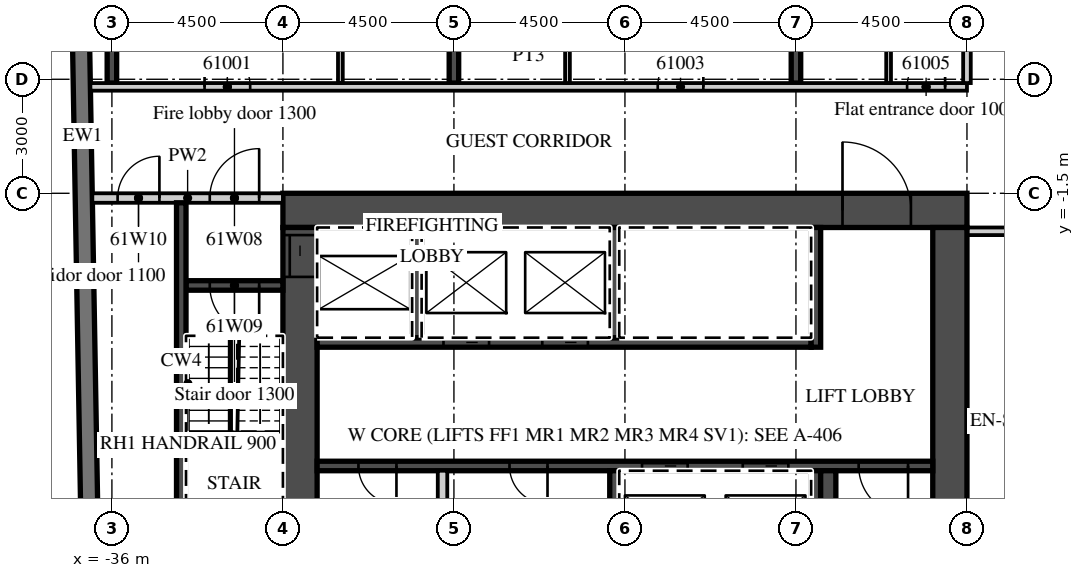
"""IFC4 building model, lengths in metres.
Left out: names, types, materials, properties, quantities, classifications, styles, units other than length and angle.
Written with IfcOpenShell. Run it as: python <this file> out.ifc"""

import sys

from ifc_helpers import new_model, si_unit, direction, frame, frame_2d, origin, place, context, subcontext, project, spatial, rectangle, extrude, element, fill, save


model = new_model("IFC4")
c1 = context("Model", 3, precision=1e-05, world=origin(), true_north=direction((0.0, 1.0)))
c2 = subcontext(c1, "Body", "Model", "MODEL_VIEW")
j1 = project(units=[si_unit("LENGTHUNIT", "METRE"), si_unit("PLANEANGLEUNIT", "RADIAN")], contexts=[c1])
p1 = place(None, origin())
s1 = spatial("IfcSite", under=j1, at=p1, CompositionType="ELEMENT")
p2 = place(p1, origin())
s2 = spatial("IfcBuilding", under=s1, at=p2, CompositionType="ELEMENT")
p3 = place(p2, frame((0.0, 0.0, 247.4)))
s3 = spatial("IfcBuildingStorey", under=s2, at=p3, CompositionType="ELEMENT", Elevation=247.4)
p4 = place(p3, frame((-36.0, 1.4, 0.0), z_axis=(0.0, 0.0, 1.0), x_axis=(0.0, 1.0, 0.0)))
e1 = element("IfcWall", 1, at=p4, inside=s3, PredefinedType="SHEAR", context=c2, shape_type="SweptSolid", body=[
    extrude(rectangle(XDim=17.125, YDim=0.25, at=frame_2d((8.563, 0.0))), origin(), (0.0, 0.0, 1.0), 3.3),
])
p5 = place(p3, frame((-27.0, 1.4, 0.0), z_axis=(0.0, 0.0, 1.0), x_axis=(0.0, 1.0, 0.0)))
e2 = element("IfcWall", 2, at=p5, inside=s3, PredefinedType="SHEAR", context=c2, shape_type="SweptSolid", body=[
    extrude(rectangle(XDim=18.817, YDim=0.25, at=frame_2d((9.409, 0.0))), origin(), (0.0, 0.0, 1.0), 3.3),
])
p6 = place(p3, frame((-18.0, 1.4, 0.0), z_axis=(0.0, 0.0, 1.0), x_axis=(0.0, 1.0, 0.0)))
e3 = element("IfcWall", 3, at=p6, inside=s3, PredefinedType="SHEAR", context=c2, shape_type="SweptSolid", body=[
    extrude(rectangle(XDim=18.974, YDim=0.25, at=frame_2d((9.487, 0.0))), origin(), (0.0, 0.0, 1.0), 3.3),
])
p7 = place(p3, frame((-37.057, 16.503, 0.0), z_axis=(0.0, 0.0, 1.0), x_axis=(0.017452279857, -0.999847697366, 0.0)))
e4 = element("IfcWall", 4, at=p7, inside=s3, PredefinedType="SOLIDWALL", context=c2, shape_type="SweptSolid", body=[
    extrude(rectangle(XDim=33.0, YDim=0.45, at=frame_2d((16.5, 0.0))), origin(), (0.0, 0.0, 1.0), 3.02),
])
p8 = place(p3, frame((-36.566, 1.3, 0.0), z_axis=(0.0, 0.0, 1.0), x_axis=(1.0, 0.0, 0.0)))
e5 = element("IfcWall", 5, at=p8, inside=s3, PredefinedType="PARTITIONING", context=c2, shape_type="SweptSolid", body=[
    extrude(rectangle(XDim=23.066, YDim=0.2, at=frame_2d((11.533, 0.0))), origin(), (0.0, 0.0, 1.0), 3.02),
])
p9 = place(p8, frame((3.004, 0.0, 0.0)))
e6 = element("IfcOpeningElement", 6, at=p9, cuts=e5, PredefinedType="OPENING", context=c2, shape_type="SweptSolid", body=[
    extrude(rectangle(XDim=1.2, YDim=2.1, at=frame_2d((0.6, 1.05))), frame((0.0, 0.11, 0.0), z_axis=(0.0, -1.0, 0.0), x_axis=(1.0, 0.0, 0.0)), (0.0, 0.0, 1.0), 0.22),
])
p10 = place(p8, frame((14.929, 0.0, 0.0)))
e7 = element("IfcOpeningElement", 7, at=p10, cuts=e5, PredefinedType="OPENING", context=c2, shape_type="SweptSolid", body=[
    extrude(rectangle(XDim=1.2, YDim=2.1, at=frame_2d((0.6, 1.05))), frame((0.0, 0.11, 0.0), z_axis=(0.0, -1.0, 0.0), x_axis=(1.0, 0.0, 0.0)), (0.0, 0.0, 1.0), 0.22),
])
p11 = place(p8, frame((21.491, 0.0, 0.0)))
e8 = element("IfcOpeningElement", 8, at=p11, cuts=e5, PredefinedType="OPENING", context=c2, shape_type="SweptSolid", body=[
    extrude(rectangle(XDim=1.0, YDim=2.1, at=frame_2d((0.5, 1.05))), frame((0.0, 0.11, 0.0), z_axis=(0.0, -1.0, 0.0), x_axis=(1.0, 0.0, 0.0)), (0.0, 0.0, 1.0), 0.22),
])
p12 = place(p3, frame((-29.988, 1.4, 0.0), z_axis=(0.0, 0.0, 1.0), x_axis=(0.0, 1.0, 0.0)))
e9 = element("IfcWall", 9, at=p12, inside=s3, PredefinedType="PARTITIONING", context=c2, shape_type="SweptSolid", body=[
    extrude(rectangle(XDim=7.725, YDim=0.125, at=frame_2d((3.863, 0.0))), origin(), (0.0, 0.0, 1.0), 3.02),
])
p13 = place(p12, frame((2.45, 0.0, 0.0)))
e10 = element("IfcOpeningElement", 10, at=p13, cuts=e9, PredefinedType="OPENING", context=c2, shape_type="SweptSolid", body=[
    extrude(rectangle(XDim=0.9, YDim=2.1, at=frame_2d((0.45, 1.05))), frame((0.0, 0.073, 0.0), z_axis=(0.0, -1.0, 0.0), x_axis=(1.0, 0.0, 0.0)), (0.0, 0.0, 1.0), 0.145),
])
p14 = place(p3, frame((-24.012, 1.4, 0.0), z_axis=(0.0, 0.0, 1.0), x_axis=(0.0, 1.0, 0.0)))
e11 = element("IfcWall", 11, at=p14, inside=s3, PredefinedType="PARTITIONING", context=c2, shape_type="SweptSolid", body=[
    extrude(rectangle(XDim=7.725, YDim=0.125, at=frame_2d((3.863, 0.0))), origin(), (0.0, 0.0, 1.0), 3.02),
])
p15 = place(p14, frame((2.45, 0.0, 0.0)))
e12 = element("IfcOpeningElement", 12, at=p15, cuts=e11, PredefinedType="OPENING", context=c2, shape_type="SweptSolid", body=[
    extrude(rectangle(XDim=0.9, YDim=2.1, at=frame_2d((0.45, 1.05))), frame((0.0, 0.073, 0.0), z_axis=(0.0, -1.0, 0.0), x_axis=(1.0, 0.0, 0.0)), (0.0, 0.0, 1.0), 0.145),
])
p16 = place(p3, frame((-13.5, 1.4, 0.0), z_axis=(0.0, 0.0, 1.0), x_axis=(0.0, 1.0, 0.0)))
e13 = element("IfcWall", 13, at=p16, inside=s3, PredefinedType="PARTITIONING", context=c2, shape_type="SweptSolid", body=[
    extrude(rectangle(XDim=19.065, YDim=0.2, at=frame_2d((9.533, 0.0))), origin(), (0.0, 0.0, 1.0), 3.02),
])
p17 = place(p3, frame((-15.562, 1.4, 0.0), z_axis=(0.0, 0.0, 1.0), x_axis=(0.0, 1.0, 0.0)))
e14 = element("IfcWall", 14, at=p17, inside=s3, PredefinedType="PARTITIONING", context=c2, shape_type="SweptSolid", body=[
    extrude(rectangle(XDim=7.725, YDim=0.125, at=frame_2d((3.863, 0.0))), origin(), (0.0, 0.0, 1.0), 3.02),
])
p18 = place(p17, frame((2.45, 0.0, 0.0)))
e15 = element("IfcOpeningElement", 15, at=p18, cuts=e14, PredefinedType="OPENING", context=c2, shape_type="SweptSolid", body=[
    extrude(rectangle(XDim=0.9, YDim=2.1, at=frame_2d((0.45, 1.05))), frame((0.0, 0.073, 0.0), z_axis=(0.0, -1.0, 0.0), x_axis=(1.0, 0.0, 0.0)), (0.0, 0.0, 1.0), 0.145),
])
p19 = place(p3, frame((-13.5, -2.5, 0.0), z_axis=(0.0, 0.0, 1.0), x_axis=(1.0, 0.0, 0.0)))
e16 = element("IfcWall", 16, at=p19, inside=s3, PredefinedType="PARTITIONING", context=c2, shape_type="SweptSolid", body=[
    extrude(rectangle(XDim=27.0, YDim=0.2, at=frame_2d((13.5, 0.0))), origin(), (0.0, 0.0, 1.0), 3.02),
])
p20 = place(p19, frame((2.925, 0.0, 0.0)))
e17 = element("IfcOpeningElement", 17, at=p20, cuts=e16, PredefinedType="OPENING", context=c2, shape_type="SweptSolid", body=[
    extrude(rectangle(XDim=1.0, YDim=2.1, at=frame_2d((0.5, 1.05))), frame((0.0, 0.11, 0.0), z_axis=(0.0, -1.0, 0.0), x_axis=(1.0, 0.0, 0.0)), (0.0, 0.0, 1.0), 0.22),
])
p21 = place(p19, frame((5.075, 0.0, 0.0)))
e18 = element("IfcOpeningElement", 18, at=p21, cuts=e16, PredefinedType="OPENING", context=c2, shape_type="SweptSolid", body=[
    extrude(rectangle(XDim=1.0, YDim=2.1, at=frame_2d((0.5, 1.05))), frame((0.0, 0.11, 0.0), z_axis=(0.0, -1.0, 0.0), x_axis=(1.0, 0.0, 0.0)), (0.0, 0.0, 1.0), 0.22),
])
p22 = place(p19, frame((9.55, 0.0, 0.0)))
e19 = element("IfcOpeningElement", 19, at=p22, cuts=e16, PredefinedType="OPENING", context=c2, shape_type="SweptSolid", body=[
    extrude(rectangle(XDim=1.0, YDim=2.1, at=frame_2d((0.5, 1.05))), frame((0.0, 0.11, 0.0), z_axis=(0.0, -1.0, 0.0), x_axis=(1.0, 0.0, 0.0)), (0.0, 0.0, 1.0), 0.22),
])
p23 = place(p19, frame((14.075, 0.0, 0.0)))
e20 = element("IfcOpeningElement", 20, at=p23, cuts=e16, PredefinedType="OPENING", context=c2, shape_type="SweptSolid", body=[
    extrude(rectangle(XDim=1.0, YDim=2.1, at=frame_2d((0.5, 1.05))), frame((0.0, 0.11, 0.0), z_axis=(0.0, -1.0, 0.0), x_axis=(1.0, 0.0, 0.0)), (0.0, 0.0, 1.0), 0.22),
])
p24 = place(p19, frame((20.925, 0.0, 0.0)))
e21 = element("IfcOpeningElement", 21, at=p24, cuts=e16, PredefinedType="OPENING", context=c2, shape_type="SweptSolid", body=[
    extrude(rectangle(XDim=1.0, YDim=2.1, at=frame_2d((0.5, 1.05))), frame((0.0, 0.11, 0.0), z_axis=(0.0, -1.0, 0.0), x_axis=(1.0, 0.0, 0.0)), (0.0, 0.0, 1.0), 0.22),
])
p25 = place(p19, frame((23.075, 0.0, 0.0)))
e22 = element("IfcOpeningElement", 22, at=p25, cuts=e16, PredefinedType="OPENING", context=c2, shape_type="SweptSolid", body=[
    extrude(rectangle(XDim=1.0, YDim=2.1, at=frame_2d((0.5, 1.05))), frame((0.0, 0.11, 0.0), z_axis=(0.0, -1.0, 0.0), x_axis=(1.0, 0.0, 0.0)), (0.0, 0.0, 1.0), 0.22),
])
p26 = place(p3, frame((-31.5, -1.95, 0.0), z_axis=(0.0, 0.0, 1.0), x_axis=(1.0, 0.0, 0.0)))
e23 = element("IfcWall", 23, at=p26, inside=s3, PredefinedType="SHEAR", context=c2, shape_type="SweptSolid", body=[
    extrude(rectangle(XDim=18.0, YDim=0.9, at=frame_2d((9.0, 0.0))), origin(), (0.0, 0.0, 1.0), 3.02),
])
p27 = place(p26, frame((14.725, 0.0, 0.0)))
e24 = element("IfcOpeningElement", 24, at=p27, cuts=e23, PredefinedType="OPENING", context=c2, shape_type="SweptSolid", body=[
    extrude(rectangle(XDim=1.8, YDim=2.1, at=frame_2d((0.9, 1.05))), frame((0.0, 0.46, 0.0), z_axis=(0.0, -1.0, 0.0), x_axis=(1.0, 0.0, 0.0)), (0.0, 0.0, 1.0), 0.92),
])
p28 = place(p3, frame((-31.05, -15.2, 0.0), z_axis=(0.0, 0.0, 1.0), x_axis=(0.0, 1.0, 0.0)))
e25 = element("IfcWall", 25, at=p28, inside=s3, PredefinedType="SHEAR", context=c2, shape_type="SweptSolid", body=[
    extrude(rectangle(XDim=12.8, YDim=0.9, at=frame_2d((6.4, 0.0))), origin(), (0.0, 0.0, 1.0), 3.02),
])
p29 = place(p28, frame((11.5, 0.0, 0.0)))
e26 = element("IfcOpeningElement", 26, at=p29, cuts=e25, PredefinedType="OPENING", context=c2, shape_type="SweptSolid", body=[
    extrude(rectangle(XDim=1.1, YDim=2.1, at=frame_2d((0.55, 1.05))), frame((0.0, 0.46, 0.0), z_axis=(0.0, -1.0, 0.0), x_axis=(1.0, 0.0, 0.0)), (0.0, 0.0, 1.0), 0.92),
])
p30 = place(p3, frame((-13.95, -14.6, 0.0), z_axis=(0.0, 0.0, 1.0), x_axis=(0.0, 1.0, 0.0)))
e27 = element("IfcWall", 27, at=p30, inside=s3, PredefinedType="SHEAR", context=c2, shape_type="SweptSolid", body=[
    extrude(rectangle(XDim=12.2, YDim=0.9, at=frame_2d((6.1, 0.0))), origin(), (0.0, 0.0, 1.0), 3.02),
])
p31 = place(p3, frame((-30.6, -5.425, 0.0), z_axis=(0.0, 0.0, 1.0), x_axis=(1.0, 0.0, 0.0)))
e28 = element("IfcWall", 28, at=p31, inside=s3, PredefinedType="SHEAR", context=c2, shape_type="SweptSolid", body=[
    extrude(rectangle(XDim=13.0, YDim=0.25, at=frame_2d((6.5, 0.0))), origin(), (0.0, 0.0, 1.0), 3.02),
])
p32 = place(p31, frame((3.325, 0.0, 0.0)))
e29 = element("IfcOpeningElement", 29, at=p32, cuts=e28, PredefinedType="OPENING", context=c2, shape_type="SweptSolid", body=[
    extrude(rectangle(XDim=1.2, YDim=2.1, at=frame_2d((0.6, 1.05))), frame((0.0, 0.135, 0.0), z_axis=(0.0, -1.0, 0.0), x_axis=(1.0, 0.0, 0.0)), (0.0, 0.0, 1.0), 0.27),
])
p33 = place(p31, frame((5.925, 0.0, 0.0)))
e30 = element("IfcOpeningElement", 30, at=p33, cuts=e28, PredefinedType="OPENING", context=c2, shape_type="SweptSolid", body=[
    extrude(rectangle(XDim=1.2, YDim=2.1, at=frame_2d((0.6, 1.05))), frame((0.0, 0.135, 0.0), z_axis=(0.0, -1.0, 0.0), x_axis=(1.0, 0.0, 0.0)), (0.0, 0.0, 1.0), 0.27),
])
p34 = place(p3, frame((-17.475, -5.55, 0.0), z_axis=(0.0, 0.0, 1.0), x_axis=(0.0, 1.0, 0.0)))
e31 = element("IfcWall", 31, at=p34, inside=s3, PredefinedType="SHEAR", context=c2, shape_type="SweptSolid", body=[
    extrude(rectangle(XDim=3.15, YDim=0.25, at=frame_2d((1.575, 0.0))), origin(), (0.0, 0.0, 1.0), 3.02),
])
for number, where, z_axis, x_axis in (
    (32, (-27.975, -5.3, 0.0), (0.0, 0.0, 1.0), (0.0, 1.0, 0.0)),
    (33, (-22.775, -5.3, 0.0), (0.0, 0.0, 1.0), (0.0, 1.0, 0.0)),
):
    element("IfcWall", number, at=place(p3, frame(where, z_axis=z_axis, x_axis=x_axis)), inside=s3, PredefinedType="SHEAR", context=c2, shape_type="SweptSolid", body=[
        extrude(rectangle(XDim=2.9, YDim=0.25, at=frame_2d((1.45, 0.0))), origin(), (0.0, 0.0, 1.0), 3.02),
    ])
p35 = place(p3, frame((-30.6, -8.675, 0.0), z_axis=(0.0, 0.0, 1.0), x_axis=(1.0, 0.0, 0.0)))
e34 = element("IfcWall", 34, at=p35, inside=s3, PredefinedType="SHEAR", context=c2, shape_type="SweptSolid", body=[
    extrude(rectangle(XDim=16.2, YDim=0.25, at=frame_2d((8.1, 0.0))), origin(), (0.0, 0.0, 1.0), 3.02),
])
p36 = place(p35, frame((8.55, 0.0, 0.0)))
e35 = element("IfcOpeningElement", 35, at=p36, cuts=e34, PredefinedType="OPENING", context=c2, shape_type="SweptSolid", body=[
    extrude(rectangle(XDim=1.2, YDim=2.1, at=frame_2d((0.6, 1.05))), frame((0.0, 0.135, 0.0), z_axis=(0.0, -1.0, 0.0), x_axis=(1.0, 0.0, 0.0)), (0.0, 0.0, 1.0), 0.27),
])
p37 = place(p35, frame((11.2, 0.0, 0.0)))
e36 = element("IfcOpeningElement", 36, at=p37, cuts=e34, PredefinedType="OPENING", context=c2, shape_type="SweptSolid", body=[
    extrude(rectangle(XDim=1.2, YDim=2.1, at=frame_2d((0.6, 1.05))), frame((0.0, 0.135, 0.0), z_axis=(0.0, -1.0, 0.0), x_axis=(1.0, 0.0, 0.0)), (0.0, 0.0, 1.0), 0.27),
])
p38 = place(p35, frame((14.25, 0.0, 0.0)))
e37 = element("IfcOpeningElement", 37, at=p38, cuts=e34, PredefinedType="OPENING", context=c2, shape_type="SweptSolid", body=[
    extrude(rectangle(XDim=1.3, YDim=2.1, at=frame_2d((0.65, 1.05))), frame((0.0, 0.135, 0.0), z_axis=(0.0, -1.0, 0.0), x_axis=(1.0, 0.0, 0.0)), (0.0, 0.0, 1.0), 0.27),
])
p39 = place(p35, frame((1.087, 0.0, 0.0)))
e38 = element("IfcOpeningElement", 38, at=p39, cuts=e34, PredefinedType="OPENING", context=c2, shape_type="SweptSolid", body=[
    extrude(rectangle(XDim=1.0, YDim=2.1, at=frame_2d((0.5, 1.05))), frame((0.0, 0.135, 0.0), z_axis=(0.0, -1.0, 0.0), x_axis=(1.0, 0.0, 0.0)), (0.0, 0.0, 1.0), 0.27),
])
p40 = place(p35, frame((5.062, 0.0, 0.0)))
e39 = element("IfcOpeningElement", 39, at=p40, cuts=e34, PredefinedType="OPENING", context=c2, shape_type="SweptSolid", body=[
    extrude(rectangle(XDim=1.0, YDim=2.1, at=frame_2d((0.5, 1.05))), frame((0.0, 0.135, 0.0), z_axis=(0.0, -1.0, 0.0), x_axis=(1.0, 0.0, 0.0)), (0.0, 0.0, 1.0), 0.27),
])
for number, where, z_axis, x_axis in (
    (40, (-17.475, -11.7, 0.0), (0.0, 0.0, 1.0), (0.0, 1.0, 0.0)),
    (41, (-22.775, -11.7, 0.0), (0.0, 0.0, 1.0), (0.0, 1.0, 0.0)),
):
    element("IfcWall", number, at=place(p3, frame(where, z_axis=z_axis, x_axis=x_axis)), inside=s3, PredefinedType="SHEAR", context=c2, shape_type="SweptSolid", body=[
        extrude(rectangle(XDim=2.9, YDim=0.25, at=frame_2d((1.45, 0.0))), origin(), (0.0, 0.0, 1.0), 3.02),
    ])
p41 = place(p3, frame((-27.3, -11.7, 0.0), z_axis=(0.0, 0.0, 1.0), x_axis=(0.0, 1.0, 0.0)))
e42 = element("IfcWall", 42, at=p41, inside=s3, PredefinedType="PARTITIONING", context=c2, shape_type="SweptSolid", body=[
    extrude(rectangle(XDim=2.9, YDim=0.25, at=frame_2d((1.45, 0.0))), origin(), (0.0, 0.0, 1.0), 3.02),
])
p42 = place(p3, frame((-17.15, -14.6, 0.0), z_axis=(0.0, 0.0, 1.0), x_axis=(0.0, 1.0, 0.0)))
e43 = element("IfcWall", 43, at=p42, inside=s3, PredefinedType="SHEAR", context=c2, shape_type="SweptSolid", body=[
    extrude(rectangle(XDim=5.8, YDim=0.4, at=frame_2d((2.9, 0.0))), origin(), (0.0, 0.0, 1.0), 3.02),
])
p43 = place(p3, frame((-36.515, -1.625, 0.0), z_axis=(0.0, 0.0, 1.0), x_axis=(1.0, 0.0, 0.0)))
e44 = element("IfcWall", 44, at=p43, inside=s3, PredefinedType="PARTITIONING", context=c2, shape_type="SweptSolid", body=[
    extrude(rectangle(XDim=5.015, YDim=0.25, at=frame_2d((2.508, 0.0))), origin(), (0.0, 0.0, 1.0), 3.02),
])
p44 = place(p43, frame((3.09, 0.0, 0.0)))
e45 = element("IfcOpeningElement", 45, at=p44, cuts=e44, PredefinedType="OPENING", context=c2, shape_type="SweptSolid", body=[
    extrude(rectangle(XDim=1.3, YDim=2.1, at=frame_2d((0.65, 1.05))), frame((0.0, 0.135, 0.0), z_axis=(0.0, -1.0, 0.0), x_axis=(1.0, 0.0, 0.0)), (0.0, 0.0, 1.0), 0.27),
])
p45 = place(p43, frame((0.665, 0.0, 0.0)))
e46 = element("IfcOpeningElement", 46, at=p45, cuts=e44, PredefinedType="OPENING", context=c2, shape_type="SweptSolid", body=[
    extrude(rectangle(XDim=1.1, YDim=2.1, at=frame_2d((0.55, 1.05))), frame((0.0, 0.135, 0.0), z_axis=(0.0, -1.0, 0.0), x_axis=(1.0, 0.0, 0.0)), (0.0, 0.0, 1.0), 0.27),
])
p46 = place(p3, frame((-34.05, -3.925, 0.0), z_axis=(0.0, 0.0, 1.0), x_axis=(1.0, 0.0, 0.0)))
e47 = element("IfcWall", 47, at=p46, inside=s3, PredefinedType="SHEAR", context=c2, shape_type="SweptSolid", body=[
    extrude(rectangle(XDim=2.55, YDim=0.25, at=frame_2d((1.275, 0.0))), origin(), (0.0, 0.0, 1.0), 3.02),
])
p47 = place(p46, frame((0.625, 0.0, 0.0)))
e48 = element("IfcOpeningElement", 48, at=p47, cuts=e47, PredefinedType="OPENING", context=c2, shape_type="SweptSolid", body=[
    extrude(rectangle(XDim=1.3, YDim=2.1, at=frame_2d((0.65, 1.05))), frame((0.0, 0.135, 0.0), z_axis=(0.0, -1.0, 0.0), x_axis=(1.0, 0.0, 0.0)), (0.0, 0.0, 1.0), 0.27),
])
p48 = place(p3, frame((-34.175, -10.1, 0.0), z_axis=(0.0, 0.0, 1.0), x_axis=(0.0, 1.0, 0.0)))
e49 = element("IfcWall", 49, at=p48, inside=s3, PredefinedType="SHEAR", context=c2, shape_type="SweptSolid", body=[
    extrude(rectangle(XDim=8.35, YDim=0.25, at=frame_2d((4.175, 0.0))), origin(), (0.0, 0.0, 1.0), 3.02),
])
p49 = place(p9, origin())
e50 = element("IfcDoor", 50, at=p49, inside=s3, OperationType="SINGLE_SWING_LEFT", PredefinedType="DOOR", context=c2, shape_type="SweptSolid", body=[
    extrude(rectangle(XDim=1.2, YDim=2.1, at=frame_2d((0.6, 1.05))), frame((0.0, 0.025, 0.0), z_axis=(0.0, -1.0, 0.0), x_axis=(1.0, 0.0, 0.0)), (0.0, 0.0, 1.0), 0.05),
])
fill(e6, e50)
p50 = place(p10, origin())
e51 = element("IfcDoor", 51, at=p50, inside=s3, OperationType="SINGLE_SWING_RIGHT", PredefinedType="DOOR", context=c2, shape_type="SweptSolid", body=[
    extrude(rectangle(XDim=1.2, YDim=2.1, at=frame_2d((0.6, 1.05))), frame((0.0, 0.025, 0.0), z_axis=(0.0, -1.0, 0.0), x_axis=(1.0, 0.0, 0.0)), (0.0, 0.0, 1.0), 0.05),
])
fill(e7, e51)
p51 = place(p11, origin())
e52 = element("IfcDoor", 52, at=p51, inside=s3, OperationType="SINGLE_SWING_RIGHT", PredefinedType="DOOR", context=c2, shape_type="SweptSolid", body=[
    extrude(rectangle(XDim=1.0, YDim=2.1, at=frame_2d((0.5, 1.05))), frame((0.0, 0.025, 0.0), z_axis=(0.0, -1.0, 0.0), x_axis=(1.0, 0.0, 0.0)), (0.0, 0.0, 1.0), 0.05),
])
fill(e8, e52)
p52 = place(p36, origin())
e53 = element("IfcDoor", 53, at=p52, inside=s3, OperationType="SLIDING_TO_LEFT", PredefinedType="DOOR", context=c2, shape_type="SweptSolid", body=[
    extrude(rectangle(XDim=1.2, YDim=2.1, at=frame_2d((0.6, 1.05))), frame((0.0, 0.025, 0.0), z_axis=(0.0, -1.0, 0.0), x_axis=(1.0, 0.0, 0.0)), (0.0, 0.0, 1.0), 0.05),
])
fill(e35, e53)
p53 = place(p37, origin())
e54 = element("IfcDoor", 54, at=p53, inside=s3, OperationType="SLIDING_TO_RIGHT", PredefinedType="DOOR", context=c2, shape_type="SweptSolid", body=[
    extrude(rectangle(XDim=1.2, YDim=2.1, at=frame_2d((0.6, 1.05))), frame((0.0, 0.025, 0.0), z_axis=(0.0, -1.0, 0.0), x_axis=(1.0, 0.0, 0.0)), (0.0, 0.0, 1.0), 0.05),
])
fill(e36, e54)
p54 = place(p32, origin())
e55 = element("IfcDoor", 55, at=p54, inside=s3, OperationType="SLIDING_TO_RIGHT", PredefinedType="DOOR", context=c2, shape_type="SweptSolid", body=[
    extrude(rectangle(XDim=1.2, YDim=2.1, at=frame_2d((0.6, 1.05))), frame((0.0, 0.025, 0.0), z_axis=(0.0, -1.0, 0.0), x_axis=(1.0, 0.0, 0.0)), (0.0, 0.0, 1.0), 0.05),
])
fill(e29, e55)
p55 = place(p33, origin())
e56 = element("IfcDoor", 56, at=p55, inside=s3, OperationType="SLIDING_TO_RIGHT", PredefinedType="DOOR", context=c2, shape_type="SweptSolid", body=[
    extrude(rectangle(XDim=1.2, YDim=2.1, at=frame_2d((0.6, 1.05))), frame((0.0, 0.025, 0.0), z_axis=(0.0, -1.0, 0.0), x_axis=(1.0, 0.0, 0.0)), (0.0, 0.0, 1.0), 0.05),
])
fill(e30, e56)
p56 = place(p29, origin())
e57 = element("IfcDoor", 57, at=p56, inside=s3, OperationType="SLIDING_TO_RIGHT", PredefinedType="DOOR", context=c2, shape_type="SweptSolid", body=[
    extrude(rectangle(XDim=1.1, YDim=2.1, at=frame_2d((0.55, 1.05))), frame((0.0, 0.025, 0.0), z_axis=(0.0, -1.0, 0.0), x_axis=(1.0, 0.0, 0.0)), (0.0, 0.0, 1.0), 0.05),
])
fill(e26, e57)
p57 = place(p27, origin())
e58 = element("IfcDoor", 58, at=p57, inside=s3, OperationType="DOUBLE_DOOR_DOUBLE_SWING", PredefinedType="DOOR", context=c2, shape_type="SweptSolid", body=[
    extrude(rectangle(XDim=1.8, YDim=2.1, at=frame_2d((0.9, 1.05))), frame((0.0, 0.025, 0.0), z_axis=(0.0, -1.0, 0.0), x_axis=(1.0, 0.0, 0.0)), (0.0, 0.0, 1.0), 0.05),
])
fill(e24, e58)
p58 = place(p44, origin())
e59 = element("IfcDoor", 59, at=p58, inside=s3, OperationType="SINGLE_SWING_RIGHT", PredefinedType="DOOR", context=c2, shape_type="SweptSolid", body=[
    extrude(rectangle(XDim=1.3, YDim=2.1, at=frame_2d((0.65, 1.05))), frame((0.0, 0.025, 0.0), z_axis=(0.0, -1.0, 0.0), x_axis=(1.0, 0.0, 0.0)), (0.0, 0.0, 1.0), 0.05),
])
fill(e45, e59)
p59 = place(p47, origin())
e60 = element("IfcDoor", 60, at=p59, inside=s3, OperationType="SINGLE_SWING_RIGHT", PredefinedType="DOOR", context=c2, shape_type="SweptSolid", body=[
    extrude(rectangle(XDim=1.3, YDim=2.1, at=frame_2d((0.65, 1.05))), frame((0.0, 0.025, 0.0), z_axis=(0.0, -1.0, 0.0), x_axis=(1.0, 0.0, 0.0)), (0.0, 0.0, 1.0), 0.05),
])
fill(e48, e60)
p60 = place(p45, origin())
e61 = element("IfcDoor", 61, at=p60, inside=s3, OperationType="SINGLE_SWING_RIGHT", PredefinedType="DOOR", context=c2, shape_type="SweptSolid", body=[
    extrude(rectangle(XDim=1.1, YDim=2.1, at=frame_2d((0.55, 1.05))), frame((0.0, 0.025, 0.0), z_axis=(0.0, -1.0, 0.0), x_axis=(1.0, 0.0, 0.0)), (0.0, 0.0, 1.0), 0.05),
])
fill(e46, e61)
p61 = place(p38, origin())
e62 = element("IfcDoor", 62, at=p61, inside=s3, OperationType="SINGLE_SWING_RIGHT", PredefinedType="DOOR", context=c2, shape_type="SweptSolid", body=[
    extrude(rectangle(XDim=1.3, YDim=2.1, at=frame_2d((0.65, 1.05))), frame((0.0, 0.025, 0.0), z_axis=(0.0, -1.0, 0.0), x_axis=(1.0, 0.0, 0.0)), (0.0, 0.0, 1.0), 0.05),
])
fill(e37, e62)
p62 = place(p39, origin())
e63 = element("IfcDoor", 63, at=p62, inside=s3, OperationType="SINGLE_SWING_RIGHT", PredefinedType="DOOR", context=c2, shape_type="SweptSolid", body=[
    extrude(rectangle(XDim=1.0, YDim=2.1, at=frame_2d((0.5, 1.05))), frame((0.0, 0.025, 0.0), z_axis=(0.0, -1.0, 0.0), x_axis=(1.0, 0.0, 0.0)), (0.0, 0.0, 1.0), 0.05),
])
fill(e38, e63)
p63 = place(p40, origin())
e64 = element("IfcDoor", 64, at=p63, inside=s3, OperationType="SINGLE_SWING_RIGHT", PredefinedType="DOOR", context=c2, shape_type="SweptSolid", body=[
    extrude(rectangle(XDim=1.0, YDim=2.1, at=frame_2d((0.5, 1.05))), frame((0.0, 0.025, 0.0), z_axis=(0.0, -1.0, 0.0), x_axis=(1.0, 0.0, 0.0)), (0.0, 0.0, 1.0), 0.05),
])
fill(e39, e64)
save(model, sys.argv[1])
